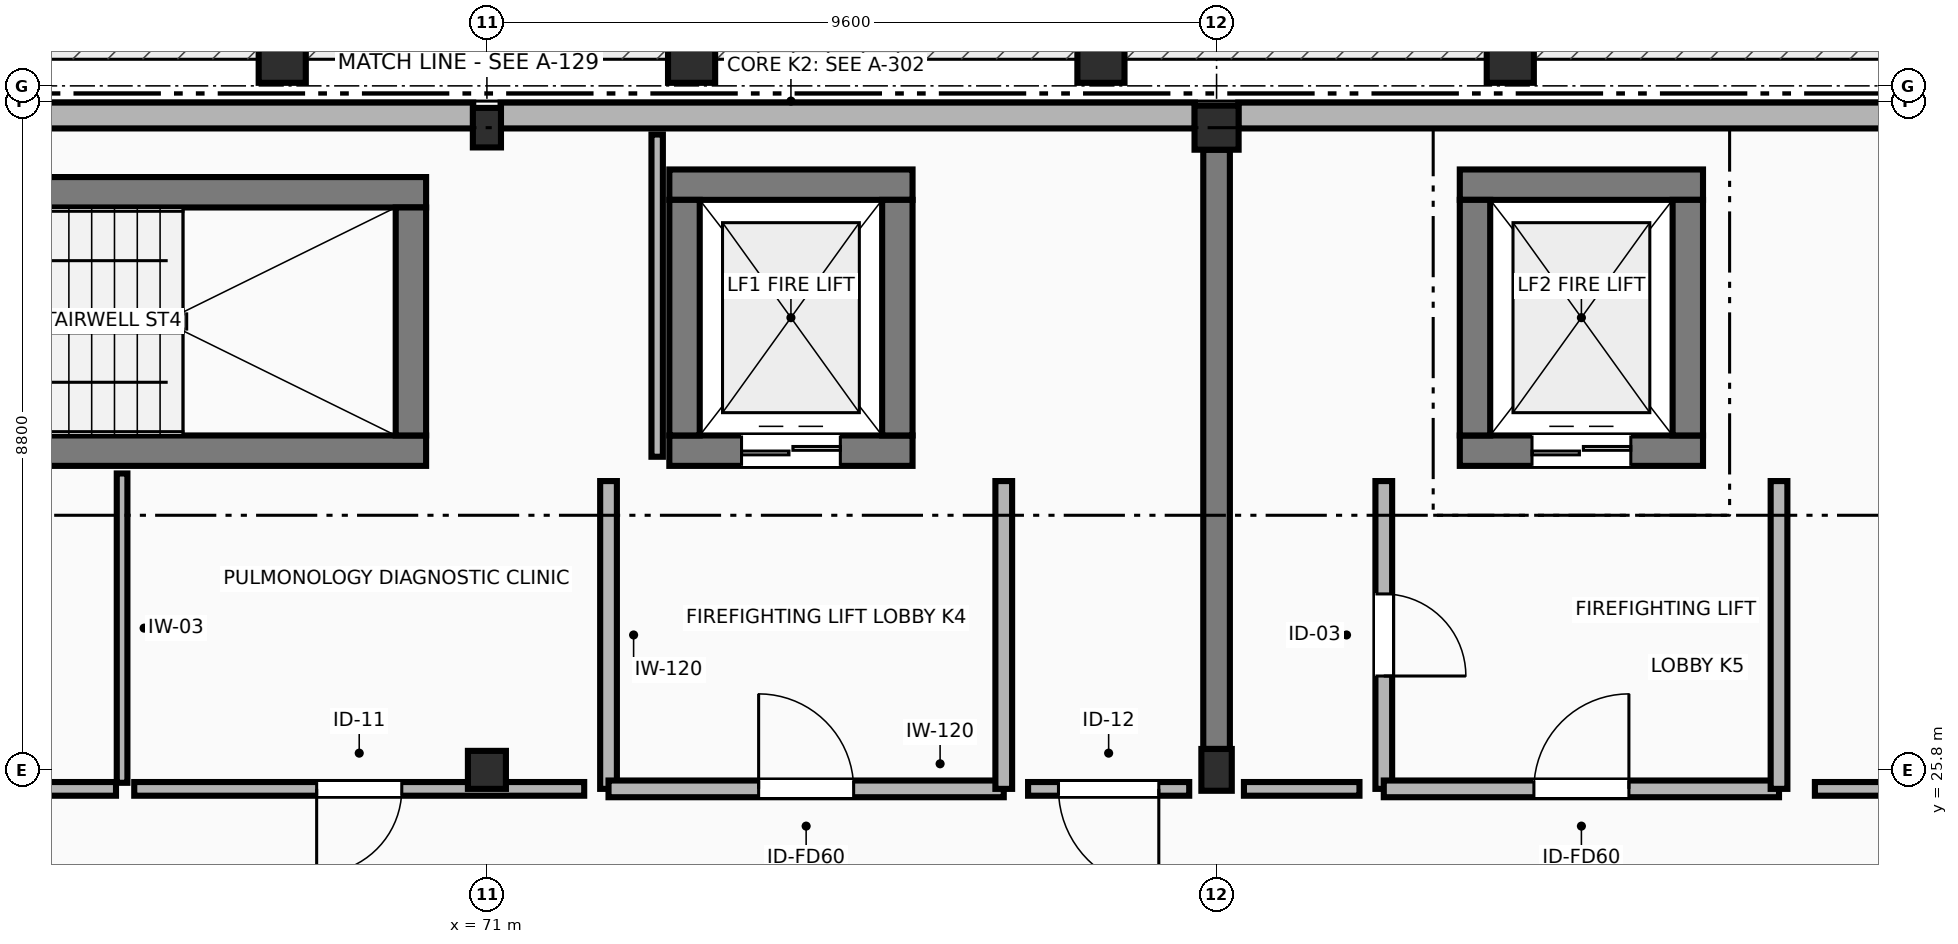
"""IFC4 building model, lengths in metres.
Left out: names, types, materials, properties, quantities, classifications, styles, units other than length and angle.
Written with IfcOpenShell. Run it as: python <this file> out.ifc"""

import sys

from ifc_helpers import new_model, si_unit, direction, frame, frame_2d, origin, origin_2d, place, context, subcontext, project, spatial, rectangle, circle, extrude, element, fill, save


model = new_model("IFC4")
c1 = context("Model", 3, precision=1e-05, world=origin(), true_north=direction((0.0, 1.0)))
c2 = subcontext(c1, "Body", "Model", "MODEL_VIEW")
j1 = project(units=[si_unit("LENGTHUNIT", "METRE"), si_unit("PLANEANGLEUNIT", "RADIAN")], contexts=[c1])
p1 = place(None, origin())
s1 = spatial("IfcSite", under=j1, at=p1, CompositionType="ELEMENT")
p2 = place(p1, origin())
s2 = spatial("IfcBuilding", under=s1, at=p2, CompositionType="ELEMENT")
p3 = place(p2, frame((0.0, 0.0, 9.6)))
s3 = spatial("IfcBuildingStorey", under=s2, at=p3, CompositionType="ELEMENT", Elevation=9.6)
p4 = place(p3, frame((71.0, 25.8, 0.0), z_axis=(0.0, 0.0, 1.0), x_axis=(1.0, 0.0, 0.0)))
e1 = element("IfcColumn", 1, at=p4, inside=s3, PredefinedType="COLUMN", context=c2, shape_type="SweptSolid", body=[
    extrude(rectangle(XDim=0.5, YDim=0.5, at=origin_2d()), origin(), (0.0, 0.0, 1.0), 4.2),
])
p5 = place(p3, frame((71.0, 34.25, 0.0), z_axis=(0.0, 0.0, 1.0), x_axis=(1.0, 0.0, 0.0)))
e2 = element("IfcColumn", 2, at=p5, inside=s3, PredefinedType="COLUMN", context=c2, shape_type="SweptSolid", body=[
    extrude(rectangle(XDim=0.37, YDim=0.52, at=origin_2d()), origin(), (0.0, 0.0, 1.0), 4.2),
])
p6 = place(p3, frame((80.6, 25.8, 0.0), z_axis=(0.0, 0.0, 1.0), x_axis=(1.0, 0.0, 0.0)))
e3 = element("IfcColumn", 3, at=p6, inside=s3, PredefinedType="COLUMN", context=c2, shape_type="SweptSolid", body=[
    extrude(rectangle(XDim=0.4, YDim=0.55, at=origin_2d()), origin(), (0.0, 0.0, 1.0), 4.2),
])
p7 = place(p3, frame((80.6, 34.25, 0.0), z_axis=(0.0, 0.0, 1.0), x_axis=(1.0, 0.0, 0.0)))
e4 = element("IfcColumn", 4, at=p7, inside=s3, PredefinedType="COLUMN", context=c2, shape_type="SweptSolid", body=[
    extrude(rectangle(XDim=0.58, YDim=0.58, at=origin_2d()), origin(), (0.0, 0.0, 1.0), 4.2),
])
for number, where, z_axis, x_axis in (
    (5, (68.307, 35.15, 0.0), (0.0, 0.0, 1.0), (1.0, 0.0, 0.0)),
    (6, (73.693, 35.15, 0.0), (0.0, 0.0, 1.0), (1.0, 0.0, 0.0)),
):
    element("IfcColumn", number, at=place(p3, frame(where, z_axis=z_axis, x_axis=x_axis)), inside=s3, PredefinedType="COLUMN", context=c2, shape_type="SweptSolid", body=[
        extrude(circle(Radius=0.31, at=origin_2d()), origin(), (0.0, 0.0, 1.0), 3.287),
    ])
p8 = place(p3, frame((79.079, 35.15, 0.0), z_axis=(0.0, 0.0, 1.0), x_axis=(1.0, 0.0, 0.0)))
e7 = element("IfcColumn", 7, at=p8, inside=s3, PredefinedType="COLUMN", context=c2, shape_type="SweptSolid", body=[
    extrude(circle(Radius=0.31, at=origin_2d()), origin(), (0.0, 0.0, 1.0), 2.725),
])
p9 = place(p3, frame((84.464, 35.15, 0.0), z_axis=(0.0, 0.0, 1.0), x_axis=(1.0, 0.0, 0.0)))
e8 = element("IfcColumn", 8, at=p9, inside=s3, PredefinedType="COLUMN", context=c2, shape_type="SweptSolid", body=[
    extrude(circle(Radius=0.31, at=origin_2d()), origin(), (0.0, 0.0, 1.0), 1.583),
])
p10 = place(p3, frame((89.94, 34.41, 0.0), z_axis=(0.0, 0.0, 1.0), x_axis=(-1.0, 0.0, 0.0)))
e9 = element("IfcWall", 9, at=p10, inside=s3, PredefinedType="STANDARD", context=c2, shape_type="SweptSolid", body=[
    extrude(rectangle(XDim=9.055, YDim=0.34, at=frame_2d((4.527, 0.0))), origin(), (0.0, 0.0, 1.0), 3.185),
])
p11 = place(p3, frame((80.315, 34.41, 0.0), z_axis=(0.0, 0.0, 1.0), x_axis=(-1.0, 0.0, 0.0)))
e10 = element("IfcWall", 10, at=p11, inside=s3, PredefinedType="STANDARD", context=c2, shape_type="SweptSolid", body=[
    extrude(rectangle(XDim=9.135, YDim=0.34, at=frame_2d((4.567, 0.0))), origin(), (0.0, 0.0, 1.0), 3.185),
])
p12 = place(p3, frame((70.82, 34.41, 0.0), z_axis=(0.0, 0.0, 1.0), x_axis=(-1.0, 0.0, 0.0)))
e11 = element("IfcWall", 11, at=p12, inside=s3, PredefinedType="STANDARD", context=c2, shape_type="SweptSolid", body=[
    extrude(rectangle(XDim=9.215, YDim=0.34, at=frame_2d((4.607, 0.0))), origin(), (0.0, 0.0, 1.0), 3.185),
])
p13 = place(p3, frame((61.8, 30.0, 0.0), z_axis=(0.0, 0.0, 1.0), x_axis=(1.0, 0.0, 0.0)))
e12 = element("IfcWall", 12, at=p13, inside=s3, PredefinedType="SHEAR", context=c2, shape_type="SweptSolid", body=[
    extrude(rectangle(XDim=8.4, YDim=0.4, at=frame_2d((4.2, 0.0))), origin(), (0.0, 0.0, 1.0), 3.92),
])
p14 = place(p13, frame((0.52, 0.0, 0.0)))
e13 = element("IfcOpeningElement", 13, at=p14, cuts=e12, PredefinedType="OPENING", context=c2, shape_type="SweptSolid", body=[
    extrude(rectangle(XDim=1.25, YDim=2.2, at=frame_2d((0.625, 1.1))), frame((0.0, 0.21, 0.0), z_axis=(0.0, -1.0, 0.0), x_axis=(1.0, 0.0, 0.0)), (0.0, 0.0, 1.0), 0.42),
])
p15 = place(p3, frame((70.2, 33.4, 0.0), z_axis=(0.0, 0.0, 1.0), x_axis=(-1.0, 0.0, 0.0)))
e14 = element("IfcWall", 14, at=p15, inside=s3, PredefinedType="SHEAR", context=c2, shape_type="SweptSolid", body=[
    extrude(rectangle(XDim=8.4, YDim=0.4, at=frame_2d((4.2, 0.0))), origin(), (0.0, 0.0, 1.0), 3.92),
])
p16 = place(p3, frame((70.0, 33.2, 0.0), z_axis=(0.0, 0.0, 1.0), x_axis=(0.0, -1.0, 0.0)))
e15 = element("IfcWall", 15, at=p16, inside=s3, PredefinedType="SHEAR", context=c2, shape_type="SweptSolid", body=[
    extrude(rectangle(XDim=3.0, YDim=0.4, at=frame_2d((1.5, 0.0))), origin(), (0.0, 0.0, 1.0), 3.92),
])
p17 = place(p3, frame((73.4, 30.0, 0.0), z_axis=(0.0, 0.0, 1.0), x_axis=(1.0, 0.0, 0.0)))
e16 = element("IfcWall", 16, at=p17, inside=s3, PredefinedType="SHEAR", context=c2, shape_type="SweptSolid", body=[
    extrude(rectangle(XDim=3.2, YDim=0.4, at=frame_2d((1.6, 0.0))), origin(), (0.0, 0.0, 1.0), 4.2),
])
p18 = place(p17, frame((0.95, 0.0, 0.0)))
e17 = element("IfcOpeningElement", 17, at=p18, cuts=e16, PredefinedType="OPENING", context=c2, shape_type="SweptSolid", body=[
    extrude(rectangle(XDim=1.3, YDim=2.25, at=frame_2d((0.65, 1.125))), frame((0.0, 0.21, 0.0), z_axis=(0.0, -1.0, 0.0), x_axis=(1.0, 0.0, 0.0)), (0.0, 0.0, 1.0), 0.42),
])
p19 = place(p3, frame((76.6, 33.5, 0.0), z_axis=(0.0, 0.0, 1.0), x_axis=(-1.0, 0.0, 0.0)))
e18 = element("IfcWall", 18, at=p19, inside=s3, PredefinedType="SHEAR", context=c2, shape_type="SweptSolid", body=[
    extrude(rectangle(XDim=3.2, YDim=0.4, at=frame_2d((1.6, 0.0))), origin(), (0.0, 0.0, 1.0), 4.2),
])
for number, where, z_axis, x_axis in (
    (19, (73.6, 30.2, 0.0), (0.0, 0.0, 1.0), (0.0, 1.0, 0.0)),
    (20, (76.4, 33.3, 0.0), (0.0, 0.0, 1.0), (0.0, -1.0, 0.0)),
):
    element("IfcWall", number, at=place(p3, frame(where, z_axis=z_axis, x_axis=x_axis)), inside=s3, PredefinedType="SHEAR", context=c2, shape_type="SweptSolid", body=[
        extrude(rectangle(XDim=3.1, YDim=0.4, at=frame_2d((1.55, 0.0))), origin(), (0.0, 0.0, 1.0), 4.2),
    ])
p20 = place(p3, frame((72.6, 29.6, 0.0), z_axis=(0.0, 0.0, 1.0), x_axis=(0.0, -1.0, 0.0)))
e21 = element("IfcWall", 21, at=p20, inside=s3, PredefinedType="PARTITIONING", context=c2, shape_type="SweptSolid", body=[
    extrude(rectangle(XDim=4.05, YDim=0.22, at=frame_2d((2.025, 0.0))), origin(), (0.0, 0.0, 1.0), 3.92),
])
p21 = place(p3, frame((72.6, 25.55, 0.0), z_axis=(0.0, 0.0, 1.0), x_axis=(1.0, 0.0, 0.0)))
e22 = element("IfcWall", 22, at=p21, inside=s3, PredefinedType="PARTITIONING", context=c2, shape_type="SweptSolid", body=[
    extrude(rectangle(XDim=5.2, YDim=0.22, at=frame_2d((2.6, 0.0))), origin(), (0.0, 0.0, 1.0), 3.225),
])
p22 = place(p21, frame((1.975, 0.0, 0.0)))
e23 = element("IfcOpeningElement", 23, at=p22, cuts=e22, PredefinedType="OPENING", context=c2, shape_type="SweptSolid", body=[
    extrude(rectangle(XDim=1.25, YDim=2.2, at=frame_2d((0.625, 1.1))), frame((0.0, 0.12, 0.0), z_axis=(0.0, -1.0, 0.0), x_axis=(1.0, 0.0, 0.0)), (0.0, 0.0, 1.0), 0.24),
])
p23 = place(p3, frame((77.8, 25.55, 0.0), z_axis=(0.0, 0.0, 1.0), x_axis=(0.0, 1.0, 0.0)))
e24 = element("IfcWall", 24, at=p23, inside=s3, PredefinedType="PARTITIONING", context=c2, shape_type="SweptSolid", body=[
    extrude(rectangle(XDim=4.05, YDim=0.22, at=frame_2d((2.025, 0.0))), origin(), (0.0, 0.0, 1.0), 3.643),
])
p24 = place(p3, frame((83.8, 30.0, 0.0), z_axis=(0.0, 0.0, 1.0), x_axis=(1.0, 0.0, 0.0)))
e25 = element("IfcWall", 25, at=p24, inside=s3, PredefinedType="SHEAR", context=c2, shape_type="SweptSolid", body=[
    extrude(rectangle(XDim=3.2, YDim=0.4, at=frame_2d((1.6, 0.0))), origin(), (0.0, 0.0, 1.0), 4.2),
])
p25 = place(p24, frame((0.95, 0.0, 0.0)))
e26 = element("IfcOpeningElement", 26, at=p25, cuts=e25, PredefinedType="OPENING", context=c2, shape_type="SweptSolid", body=[
    extrude(rectangle(XDim=1.3, YDim=2.25, at=frame_2d((0.65, 1.125))), frame((0.0, 0.21, 0.0), z_axis=(0.0, -1.0, 0.0), x_axis=(1.0, 0.0, 0.0)), (0.0, 0.0, 1.0), 0.42),
])
p26 = place(p3, frame((87.0, 33.5, 0.0), z_axis=(0.0, 0.0, 1.0), x_axis=(-1.0, 0.0, 0.0)))
e27 = element("IfcWall", 27, at=p26, inside=s3, PredefinedType="SHEAR", context=c2, shape_type="SweptSolid", body=[
    extrude(rectangle(XDim=3.2, YDim=0.4, at=frame_2d((1.6, 0.0))), origin(), (0.0, 0.0, 1.0), 4.2),
])
for number, where, z_axis, x_axis in (
    (28, (84.0, 30.2, 0.0), (0.0, 0.0, 1.0), (0.0, 1.0, 0.0)),
    (29, (86.8, 33.3, 0.0), (0.0, 0.0, 1.0), (0.0, -1.0, 0.0)),
):
    element("IfcWall", number, at=place(p3, frame(where, z_axis=z_axis, x_axis=x_axis)), inside=s3, PredefinedType="SHEAR", context=c2, shape_type="SweptSolid", body=[
        extrude(rectangle(XDim=3.1, YDim=0.4, at=frame_2d((1.55, 0.0))), origin(), (0.0, 0.0, 1.0), 4.2),
    ])
p27 = place(p3, frame((82.8, 29.6, 0.0), z_axis=(0.0, 0.0, 1.0), x_axis=(0.0, -1.0, 0.0)))
e30 = element("IfcWall", 30, at=p27, inside=s3, PredefinedType="PARTITIONING", context=c2, shape_type="SweptSolid", body=[
    extrude(rectangle(XDim=4.05, YDim=0.22, at=frame_2d((2.025, 0.0))), origin(), (0.0, 0.0, 1.0), 3.92),
])
p28 = place(p27, frame((1.485, 0.0, 0.0)))
e31 = element("IfcOpeningElement", 31, at=p28, cuts=e30, PredefinedType="OPENING", context=c2, shape_type="SweptSolid", body=[
    extrude(rectangle(XDim=1.08, YDim=2.2, at=frame_2d((0.54, 1.1))), frame((0.0, 0.12, 0.0), z_axis=(0.0, -1.0, 0.0), x_axis=(1.0, 0.0, 0.0)), (0.0, 0.0, 1.0), 0.24),
])
p29 = place(p3, frame((82.8, 25.55, 0.0), z_axis=(0.0, 0.0, 1.0), x_axis=(1.0, 0.0, 0.0)))
e32 = element("IfcWall", 32, at=p29, inside=s3, PredefinedType="PARTITIONING", context=c2, shape_type="SweptSolid", body=[
    extrude(rectangle(XDim=5.2, YDim=0.22, at=frame_2d((2.6, 0.0))), origin(), (0.0, 0.0, 1.0), 3.225),
])
p30 = place(p29, frame((1.975, 0.0, 0.0)))
e33 = element("IfcOpeningElement", 33, at=p30, cuts=e32, PredefinedType="OPENING", context=c2, shape_type="SweptSolid", body=[
    extrude(rectangle(XDim=1.25, YDim=2.2, at=frame_2d((0.625, 1.1))), frame((0.0, 0.12, 0.0), z_axis=(0.0, -1.0, 0.0), x_axis=(1.0, 0.0, 0.0)), (0.0, 0.0, 1.0), 0.24),
])
p31 = place(p3, frame((88.0, 25.55, 0.0), z_axis=(0.0, 0.0, 1.0), x_axis=(0.0, 1.0, 0.0)))
e34 = element("IfcWall", 34, at=p31, inside=s3, PredefinedType="PARTITIONING", context=c2, shape_type="SweptSolid", body=[
    extrude(rectangle(XDim=4.05, YDim=0.22, at=frame_2d((2.025, 0.0))), origin(), (0.0, 0.0, 1.0), 3.92),
])
p32 = place(p3, frame((80.6, 26.075, 0.0), z_axis=(0.0, 0.0, 1.0), x_axis=(0.0, 1.0, 0.0)))
e35 = element("IfcWall", 35, at=p32, inside=s3, PredefinedType="SHEAR", context=c2, shape_type="SweptSolid", body=[
    extrude(rectangle(XDim=7.885, YDim=0.35, at=frame_2d((3.942, 0.0))), origin(), (0.0, 0.0, 1.0), 3.92),
])
p33 = place(p3, frame((66.2, 29.7, 0.0), z_axis=(0.0, 0.0, 1.0), x_axis=(0.0, -1.0, 0.0)))
e36 = element("IfcWall", 36, at=p33, inside=s3, PredefinedType="PARTITIONING", context=c2, shape_type="SweptSolid", body=[
    extrude(rectangle(XDim=4.07, YDim=0.14, at=frame_2d((2.035, 0.0))), origin(), (0.0, 0.0, 1.0), 3.92),
])
p34 = place(p3, frame((66.12, 25.55, 0.0), z_axis=(0.0, 0.0, 1.0), x_axis=(-1.0, 0.0, 0.0)))
e37 = element("IfcWall", 37, at=p34, inside=s3, PredefinedType="PARTITIONING", context=c2, shape_type="SweptSolid", body=[
    extrude(rectangle(XDim=6.8, YDim=0.18, at=frame_2d((3.4, 0.0))), origin(), (0.0, 0.0, 1.0), 3.225),
])
p35 = place(p34, frame((2.79, 0.0, 0.0)))
e38 = element("IfcOpeningElement", 38, at=p35, cuts=e37, PredefinedType="OPENING", context=c2, shape_type="SweptSolid", body=[
    extrude(rectangle(XDim=1.22, YDim=2.18, at=frame_2d((0.61, 1.09))), frame((0.0, 0.1, 0.0), z_axis=(0.0, -1.0, 0.0), x_axis=(1.0, 0.0, 0.0)), (0.0, 0.0, 1.0), 0.2),
])
p36 = place(p3, frame((72.28, 25.55, 0.0), z_axis=(0.0, 0.0, 1.0), x_axis=(-1.0, 0.0, 0.0)))
e39 = element("IfcWall", 39, at=p36, inside=s3, PredefinedType="PARTITIONING", context=c2, shape_type="SweptSolid", body=[
    extrude(rectangle(XDim=5.92, YDim=0.18, at=frame_2d((2.96, 0.0))), origin(), (0.0, 0.0, 1.0), 3.225),
])
p37 = place(p36, frame((2.4, 0.0, 0.0)))
e40 = element("IfcOpeningElement", 40, at=p37, cuts=e39, PredefinedType="OPENING", context=c2, shape_type="SweptSolid", body=[
    extrude(rectangle(XDim=1.12, YDim=2.16, at=frame_2d((0.56, 1.08))), frame((0.0, 0.1, 0.0), z_axis=(0.0, -1.0, 0.0), x_axis=(1.0, 0.0, 0.0)), (0.0, 0.0, 1.0), 0.2),
])
p38 = place(p3, frame((73.24, 34.16, 0.0), z_axis=(0.0, 0.0, 1.0), x_axis=(0.0, -1.0, 0.0)))
e41 = element("IfcWall", 41, at=p38, inside=s3, PredefinedType="PARTITIONING", context=c2, shape_type="SweptSolid", body=[
    extrude(rectangle(XDim=4.24, YDim=0.15, at=frame_2d((2.12, 0.0))), origin(), (0.0, 0.0, 1.0), 3.92),
])
p39 = place(p3, frame((80.24, 25.55, 0.0), z_axis=(0.0, 0.0, 1.0), x_axis=(-1.0, 0.0, 0.0)))
e42 = element("IfcWall", 42, at=p39, inside=s3, PredefinedType="PARTITIONING", context=c2, shape_type="SweptSolid", body=[
    extrude(rectangle(XDim=2.12, YDim=0.18, at=frame_2d((1.06, 0.0))), origin(), (0.0, 0.0, 1.0), 3.225),
])
p40 = place(p39, frame((0.4, 0.0, 0.0)))
e43 = element("IfcOpeningElement", 43, at=p40, cuts=e42, PredefinedType="OPENING", context=c2, shape_type="SweptSolid", body=[
    extrude(rectangle(XDim=1.32, YDim=2.22, at=frame_2d((0.66, 1.11))), frame((0.0, 0.1, 0.0), z_axis=(0.0, -1.0, 0.0), x_axis=(1.0, 0.0, 0.0)), (0.0, 0.0, 1.0), 0.2),
])
p41 = place(p3, frame((82.48, 25.55, 0.0), z_axis=(0.0, 0.0, 1.0), x_axis=(-1.0, 0.0, 0.0)))
e44 = element("IfcWall", 44, at=p41, inside=s3, PredefinedType="PARTITIONING", context=c2, shape_type="SweptSolid", body=[
    extrude(rectangle(XDim=1.52, YDim=0.18, at=frame_2d((0.76, 0.0))), origin(), (0.0, 0.0, 1.0), 3.225),
])
p42 = place(p3, frame((95.704, 25.55, 0.0), z_axis=(0.0, 0.0, 1.0), x_axis=(-1.0, 0.0, 0.0)))
e45 = element("IfcWall", 45, at=p42, inside=s3, PredefinedType="PARTITIONING", context=c2, shape_type="SweptSolid", body=[
    extrude(rectangle(XDim=7.232, YDim=0.18, at=frame_2d((3.616, 0.0))), origin(), (0.0, 0.0, 1.0), 3.225),
])
p43 = place(p42, frame((3.116, 0.0, 0.0)))
e46 = element("IfcOpeningElement", 46, at=p43, cuts=e45, PredefinedType="OPENING", context=c2, shape_type="SweptSolid", body=[
    extrude(rectangle(XDim=1.0, YDim=2.15, at=frame_2d((0.5, 1.075))), frame((0.0, 0.1, 0.0), z_axis=(0.0, -1.0, 0.0), x_axis=(1.0, 0.0, 0.0)), (0.0, 0.0, 1.0), 0.2),
])
p44 = place(p18, origin())
e47 = element("IfcDoor", 47, at=p44, inside=s3, OperationType="DOUBLE_DOOR_SLIDING", PredefinedType="DOOR", context=c2, shape_type="SweptSolid", body=[
    extrude(rectangle(XDim=1.3, YDim=2.25, at=frame_2d((0.65, 1.125))), frame((0.0, 0.025, 0.0), z_axis=(0.0, -1.0, 0.0), x_axis=(1.0, 0.0, 0.0)), (0.0, 0.0, 1.0), 0.05),
])
fill(e17, e47)
p45 = place(p22, origin())
e48 = element("IfcDoor", 48, at=p45, inside=s3, OperationType="SINGLE_SWING_LEFT", PredefinedType="DOOR", context=c2, shape_type="SweptSolid", body=[
    extrude(rectangle(XDim=1.25, YDim=2.2, at=frame_2d((0.625, 1.1))), frame((0.0, 0.025, 0.0), z_axis=(0.0, -1.0, 0.0), x_axis=(1.0, 0.0, 0.0)), (0.0, 0.0, 1.0), 0.05),
])
fill(e23, e48)
p46 = place(p25, origin())
e49 = element("IfcDoor", 49, at=p46, inside=s3, OperationType="DOUBLE_DOOR_SLIDING", PredefinedType="DOOR", context=c2, shape_type="SweptSolid", body=[
    extrude(rectangle(XDim=1.3, YDim=2.25, at=frame_2d((0.65, 1.125))), frame((0.0, 0.025, 0.0), z_axis=(0.0, -1.0, 0.0), x_axis=(1.0, 0.0, 0.0)), (0.0, 0.0, 1.0), 0.05),
])
fill(e26, e49)
p47 = place(p30, origin())
e50 = element("IfcDoor", 50, at=p47, inside=s3, OperationType="SINGLE_SWING_RIGHT", PredefinedType="DOOR", context=c2, shape_type="SweptSolid", body=[
    extrude(rectangle(XDim=1.25, YDim=2.2, at=frame_2d((0.625, 1.1))), frame((0.0, 0.025, 0.0), z_axis=(0.0, -1.0, 0.0), x_axis=(1.0, 0.0, 0.0)), (0.0, 0.0, 1.0), 0.05),
])
fill(e33, e50)
p48 = place(p37, origin())
e51 = element("IfcDoor", 51, at=p48, inside=s3, OperationType="SINGLE_SWING_RIGHT", PredefinedType="DOOR", context=c2, shape_type="SweptSolid", body=[
    extrude(rectangle(XDim=1.12, YDim=2.16, at=frame_2d((0.56, 1.08))), frame((0.0, 0.025, 0.0), z_axis=(0.0, -1.0, 0.0), x_axis=(1.0, 0.0, 0.0)), (0.0, 0.0, 1.0), 0.05),
])
fill(e40, e51)
p49 = place(p40, origin())
e52 = element("IfcDoor", 52, at=p49, inside=s3, OperationType="SINGLE_SWING_LEFT", PredefinedType="DOOR", context=c2, shape_type="SweptSolid", body=[
    extrude(rectangle(XDim=1.32, YDim=2.22, at=frame_2d((0.66, 1.11))), frame((0.0, 0.025, 0.0), z_axis=(0.0, -1.0, 0.0), x_axis=(1.0, 0.0, 0.0)), (0.0, 0.0, 1.0), 0.05),
])
fill(e43, e52)
p50 = place(p28, origin())
e53 = element("IfcDoor", 53, at=p50, inside=s3, OperationType="SINGLE_SWING_RIGHT", PredefinedType="DOOR", context=c2, shape_type="SweptSolid", body=[
    extrude(rectangle(XDim=1.08, YDim=2.2, at=frame_2d((0.54, 1.1))), frame((0.0, 0.025, 0.0), z_axis=(0.0, -1.0, 0.0), x_axis=(1.0, 0.0, 0.0)), (0.0, 0.0, 1.0), 0.05),
])
fill(e31, e53)
save(model, sys.argv[1])
